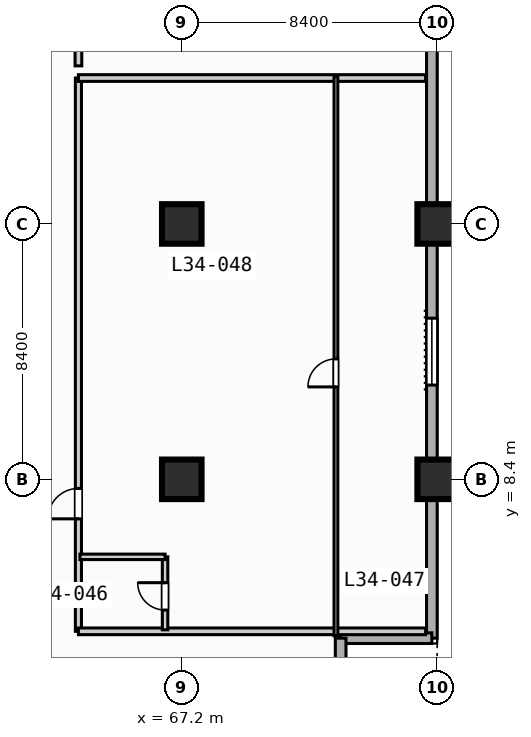
"""IFC4 building model, lengths in metres.
Left out: names, types, materials, properties, quantities, classifications, styles, units other than length and angle.
Written with IfcOpenShell. Run it as: python <this file> out.ifc"""

import sys

from ifc_helpers import new_model, si_unit, direction, frame, frame_2d, origin, origin_2d, place, context, subcontext, project, spatial, rectangle, extrude, element, fill, save


model = new_model("IFC4")
c1 = context("Model", 3, precision=1e-05, world=origin(), true_north=direction((0.0, 1.0)))
c2 = subcontext(c1, "Body", "Model", "MODEL_VIEW")
j1 = project(units=[si_unit("LENGTHUNIT", "METRE"), si_unit("PLANEANGLEUNIT", "RADIAN")], contexts=[c1])
p1 = place(None, origin())
s1 = spatial("IfcSite", under=j1, at=p1, CompositionType="ELEMENT")
p2 = place(p1, origin())
s2 = spatial("IfcBuilding", under=s1, at=p2, CompositionType="ELEMENT")
p3 = place(p2, frame((0.0, 0.0, 141.8)))
s3 = spatial("IfcBuildingStorey", under=s2, at=p3, CompositionType="ELEMENT", Elevation=141.8)
for number, where, z_axis, x_axis in (
    (1, (67.2, 8.4, 0.0), (0.0, 0.0, 1.0), (1.0, 0.0, 0.0)),
    (2, (67.2, 16.8, 0.0), (0.0, 0.0, 1.0), (1.0, 0.0, 0.0)),
    (3, (75.6, 8.4, 0.0), (0.0, 0.0, 1.0), (1.0, 0.0, 0.0)),
    (4, (75.6, 16.8, 0.0), (0.0, 0.0, 1.0), (1.0, 0.0, 0.0)),
):
    element("IfcColumn", number, at=place(p3, frame(where, z_axis=z_axis, x_axis=x_axis)), inside=s3, PredefinedType="COLUMN", context=c2, shape_type="SweptSolid", body=[
        extrude(rectangle(XDim=1.3, YDim=1.3, at=origin_2d()), origin(), (0.0, 0.0, 1.0), 3.8),
    ])
p4 = place(p3, frame((75.425, 30.425, 0.0), z_axis=(0.0, 0.0, 1.0), x_axis=(0.0, -1.0, 0.0)))
e5 = element("IfcWall", 5, at=p4, inside=s3, PredefinedType="STANDARD", context=c2, shape_type="SweptSolid", body=[
    extrude(rectangle(XDim=27.25, YDim=0.35, at=frame_2d((13.625, 0.0))), origin(), (0.0, 0.0, 1.0), 3.55),
])
p5 = place(p4, frame((16.725, 0.0, 0.85)))
e6 = element("IfcOpeningElement", 6, at=p5, cuts=e5, PredefinedType="OPENING", context=c2, shape_type="SweptSolid", body=[
    extrude(rectangle(XDim=2.2, YDim=1.8, at=frame_2d((1.1, 0.9))), frame((0.0, 0.185, 0.0), z_axis=(0.0, -1.0, 0.0), x_axis=(1.0, 0.0, 0.0)), (0.0, 0.0, 1.0), 0.37),
])
for number, where, z_axis, x_axis in (
    (7, (75.425, 3.175, 0.0), (0.0, 0.0, 1.0), (-1.0, 0.0, 0.0)),
    (8, (72.425, 3.175, 0.0), (0.0, 0.0, 1.0), (0.0, -1.0, 0.0)),
):
    element("IfcWall", number, at=place(p3, frame(where, z_axis=z_axis, x_axis=x_axis)), inside=s3, PredefinedType="STANDARD", context=c2, shape_type="SweptSolid", body=[
        extrude(rectangle(XDim=3.0, YDim=0.35, at=frame_2d((1.5, 0.0))), origin(), (0.0, 0.0, 1.0), 3.55),
    ])
p6 = place(p3, frame((63.8, 3.4, 0.0), z_axis=(0.0, 0.0, 1.0), x_axis=(0.0, 1.0, 0.0)))
e9 = element("IfcWall", 9, at=p6, inside=s3, PredefinedType="PARTITIONING", context=c2, shape_type="SweptSolid", body=[
    extrude(rectangle(XDim=18.2, YDim=0.2, at=frame_2d((9.1, 0.0))), origin(), (0.0, 0.0, 1.0), 3.55),
])
p7 = place(p6, frame((3.7, 0.0, 0.0)))
e10 = element("IfcOpeningElement", 10, at=p7, cuts=e9, PredefinedType="OPENING", context=c2, shape_type="SweptSolid", body=[
    extrude(rectangle(XDim=1.0, YDim=2.15, at=frame_2d((0.5, 1.075))), frame((0.0, 0.11, 0.0), z_axis=(0.0, -1.0, 0.0), x_axis=(1.0, 0.0, 0.0)), (0.0, 0.0, 1.0), 0.22),
])
for number, where, z_axis, x_axis in (
    (11, (63.8, 3.4, 0.0), (0.0, 0.0, 1.0), (1.0, 0.0, 0.0)),
    (12, (63.8, 21.6, 0.0), (0.0, 0.0, 1.0), (1.0, 0.0, 0.0)),
):
    element("IfcWall", number, at=place(p3, frame(where, z_axis=z_axis, x_axis=x_axis)), inside=s3, PredefinedType="PARTITIONING", context=c2, shape_type="SweptSolid", body=[
        extrude(rectangle(XDim=11.42, YDim=0.22, at=frame_2d((5.71, 0.0))), origin(), (0.0, 0.0, 1.0), 3.55),
    ])
p8 = place(p3, frame((66.65, 3.45, 0.0), z_axis=(0.0, 0.0, 1.0), x_axis=(0.0, 1.0, 0.0)))
e13 = element("IfcWall", 13, at=p8, inside=s3, PredefinedType="PLUMBINGWALL", context=c2, shape_type="SweptSolid", body=[
    extrude(rectangle(XDim=2.4, YDim=0.18, at=frame_2d((1.2, 0.0))), origin(), (0.0, 0.0, 1.0), 3.55),
])
p9 = place(p8, frame((0.65, 0.0, 0.0)))
e14 = element("IfcOpeningElement", 14, at=p9, cuts=e13, PredefinedType="OPENING", context=c2, shape_type="SweptSolid", body=[
    extrude(rectangle(XDim=0.9, YDim=2.1, at=frame_2d((0.45, 1.05))), frame((0.0, 0.1, 0.0), z_axis=(0.0, -1.0, 0.0), x_axis=(1.0, 0.0, 0.0)), (0.0, 0.0, 1.0), 0.2),
])
p10 = place(p3, frame((63.85, 5.85, 0.0), z_axis=(0.0, 0.0, 1.0), x_axis=(1.0, 0.0, 0.0)))
e15 = element("IfcWall", 15, at=p10, inside=s3, PredefinedType="PLUMBINGWALL", context=c2, shape_type="SweptSolid", body=[
    extrude(rectangle(XDim=2.8, YDim=0.18, at=frame_2d((1.4, 0.0))), origin(), (0.0, 0.0, 1.0), 3.55),
])
p11 = place(p3, frame((72.27, 3.25, 0.0), z_axis=(0.0, 0.0, 1.0), x_axis=(0.0, 1.0, 0.0)))
e16 = element("IfcWall", 16, at=p11, inside=s3, PredefinedType="PARTITIONING", context=c2, shape_type="SweptSolid", body=[
    extrude(rectangle(XDim=18.4, YDim=0.125, at=frame_2d((9.2, 0.0))), origin(), (0.0, 0.0, 1.0), 3.55),
])
p12 = place(p11, frame((8.19, 0.0, 0.0)))
e17 = element("IfcOpeningElement", 17, at=p12, cuts=e16, PredefinedType="OPENING", context=c2, shape_type="SweptSolid", body=[
    extrude(rectangle(XDim=0.92, YDim=2.1, at=frame_2d((0.46, 1.05))), frame((0.0, 0.073, 0.0), z_axis=(0.0, -1.0, 0.0), x_axis=(1.0, 0.0, 0.0)), (0.0, 0.0, 1.0), 0.145),
])
p13 = place(p3, frame((63.8, 22.0, 0.0), z_axis=(0.0, 0.0, 1.0), x_axis=(0.0, 1.0, 0.0)))
e18 = element("IfcWall", 18, at=p13, inside=s3, PredefinedType="PARTITIONING", context=c2, shape_type="SweptSolid", body=[
    extrude(rectangle(XDim=6.0, YDim=0.22, at=frame_2d((3.0, 0.0))), origin(), (0.0, 0.0, 1.0), 3.55),
])
p14 = place(p5, origin())
e19 = element("IfcWindow", 19, at=p14, inside=s3, PartitioningType="SINGLE_PANEL", PredefinedType="WINDOW", context=c2, shape_type="SweptSolid", body=[
    extrude(rectangle(XDim=2.2, YDim=1.8, at=frame_2d((1.1, 0.9))), frame((0.0, 0.03, 0.0), z_axis=(0.0, -1.0, 0.0), x_axis=(1.0, 0.0, 0.0)), (0.0, 0.0, 1.0), 0.06),
])
fill(e6, e19)
p15 = place(p7, origin())
e20 = element("IfcDoor", 20, at=p15, inside=s3, OperationType="SINGLE_SWING_LEFT", PredefinedType="DOOR", context=c2, shape_type="SweptSolid", body=[
    extrude(rectangle(XDim=1.0, YDim=2.15, at=frame_2d((0.5, 1.075))), frame((0.0, 0.025, 0.0), z_axis=(0.0, -1.0, 0.0), x_axis=(1.0, 0.0, 0.0)), (0.0, 0.0, 1.0), 0.05),
])
fill(e10, e20)
p16 = place(p9, origin())
e21 = element("IfcDoor", 21, at=p16, inside=s3, OperationType="SINGLE_SWING_RIGHT", PredefinedType="DOOR", context=c2, shape_type="SweptSolid", body=[
    extrude(rectangle(XDim=0.9, YDim=2.1, at=frame_2d((0.45, 1.05))), frame((0.0, 0.025, 0.0), z_axis=(0.0, -1.0, 0.0), x_axis=(1.0, 0.0, 0.0)), (0.0, 0.0, 1.0), 0.05),
])
fill(e14, e21)
p17 = place(p12, origin())
e22 = element("IfcDoor", 22, at=p17, inside=s3, OperationType="SINGLE_SWING_LEFT", PredefinedType="DOOR", context=c2, shape_type="SweptSolid", body=[
    extrude(rectangle(XDim=0.92, YDim=2.1, at=frame_2d((0.46, 1.05))), frame((0.0, 0.025, 0.0), z_axis=(0.0, -1.0, 0.0), x_axis=(1.0, 0.0, 0.0)), (0.0, 0.0, 1.0), 0.05),
])
fill(e17, e22)
save(model, sys.argv[1])
